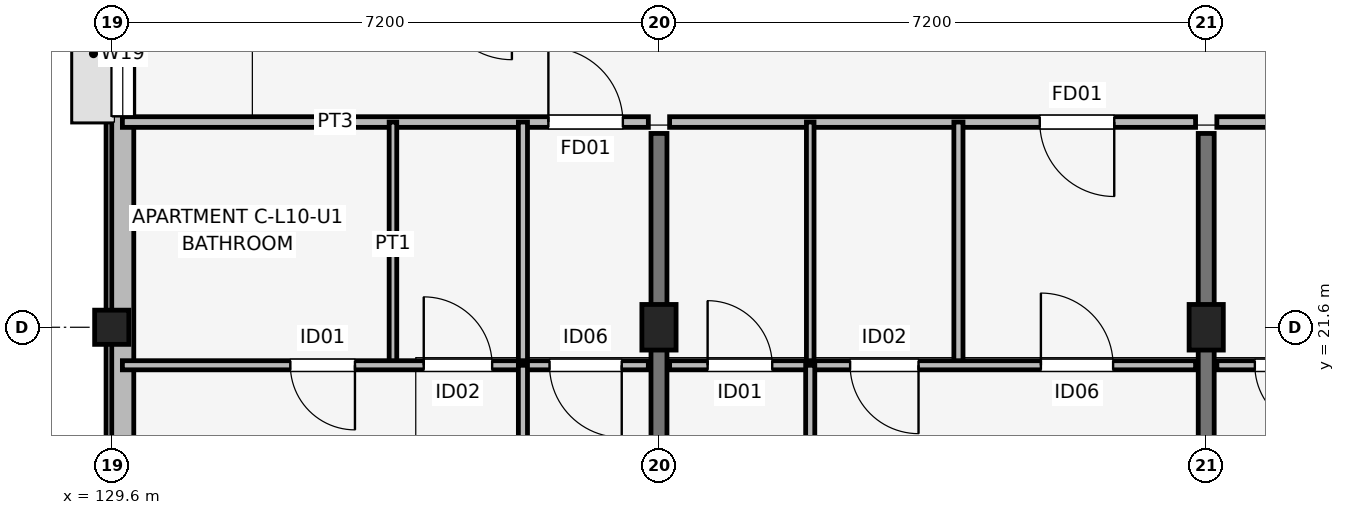
"""IFC4 building model, lengths in metres.
Left out: names, types, materials, properties, quantities, classifications, styles, units other than length and angle.
Written with IfcOpenShell. Run it as: python <this file> out.ifc"""

import sys

from ifc_helpers import new_model, si_unit, direction, frame, frame_2d, origin, origin_2d, place, context, subcontext, project, spatial, rectangle, extrude, element, fill, save


model = new_model("IFC4")
c1 = context("Model", 3, precision=1e-05, world=origin(), true_north=direction((0.0, 1.0)))
c2 = subcontext(c1, "Body", "Model", "MODEL_VIEW")
j1 = project(units=[si_unit("LENGTHUNIT", "METRE"), si_unit("PLANEANGLEUNIT", "RADIAN")], contexts=[c1])
p1 = place(None, origin())
s1 = spatial("IfcSite", under=j1, at=p1, CompositionType="ELEMENT")
p2 = place(p1, origin())
s2 = spatial("IfcBuilding", under=s1, at=p2, CompositionType="ELEMENT")
p3 = place(p2, frame((0.0, 0.0, 33.9)))
s3 = spatial("IfcBuildingStorey", under=s2, at=p3, CompositionType="ELEMENT", Elevation=33.9)
p4 = place(p3, frame((129.6, 21.6, 0.0), z_axis=(0.0, 0.0, 1.0), x_axis=(1.0, 0.0, 0.0)))
e1 = element("IfcColumn", 1, at=p4, inside=s3, PredefinedType="COLUMN", context=c2, shape_type="SweptSolid", body=[
    extrude(rectangle(XDim=0.45, YDim=0.45, at=origin_2d()), origin(), (0.0, 0.0, 1.0), 3.15),
])
for number, where, z_axis, x_axis in (
    (2, (136.8, 21.6, 0.0), (0.0, 0.0, 1.0), (1.0, 0.0, 0.0)),
    (3, (144.0, 21.6, 0.0), (0.0, 0.0, 1.0), (1.0, 0.0, 0.0)),
):
    element("IfcColumn", number, at=place(p3, frame(where, z_axis=z_axis, x_axis=x_axis)), inside=s3, PredefinedType="COLUMN", context=c2, shape_type="SweptSolid", body=[
        extrude(rectangle(XDim=0.45, YDim=0.6, at=origin_2d()), origin(), (0.0, 0.0, 1.0), 3.15),
    ])
for number, where, z_axis, x_axis in (
    (4, (136.8, 14.75, 0.0), (0.0, 0.0, 1.0), (0.0, 1.0, 0.0)),
    (5, (144.0, 14.75, 0.0), (0.0, 0.0, 1.0), (0.0, 1.0, 0.0)),
):
    element("IfcWall", number, at=place(p3, frame(where, z_axis=z_axis, x_axis=x_axis)), inside=s3, PredefinedType="SHEAR", context=c2, shape_type="SweptSolid", body=[
        extrude(rectangle(XDim=9.4, YDim=0.21, at=frame_2d((4.7, 0.0))), origin(), (0.0, 0.0, 1.0), 3.15),
    ])
p5 = place(p3, frame((129.745, 33.0, 0.0), z_axis=(0.0, 0.0, 1.0), x_axis=(0.0, -1.0, 0.0)))
e6 = element("IfcWall", 6, at=p5, inside=s3, PredefinedType="SOLIDWALL", context=c2, shape_type="SweptSolid", body=[
    extrude(rectangle(XDim=15.6, YDim=0.29, at=frame_2d((7.8, 0.0))), origin(), (0.0, 0.0, 1.0), 2.48),
])
p6 = place(p5, frame((6.975, 0.0, 1.05)))
e7 = element("IfcOpeningElement", 7, at=p6, cuts=e6, PredefinedType="OPENING", context=c2, shape_type="SweptSolid", body=[
    extrude(rectangle(XDim=1.65, YDim=1.15, at=frame_2d((0.825, 0.575))), frame((0.0, 0.155, 0.0), z_axis=(0.0, -1.0, 0.0), x_axis=(1.0, 0.0, 0.0)), (0.0, 0.0, 1.0), 0.31),
])
p7 = place(p5, frame((12.925, 0.0, 0.75)))
e8 = element("IfcOpeningElement", 8, at=p7, cuts=e6, PredefinedType="OPENING", context=c2, shape_type="SweptSolid", body=[
    extrude(rectangle(XDim=1.42, YDim=1.6, at=frame_2d((0.71, 0.8))), frame((0.0, 0.155, 0.0), z_axis=(0.0, -1.0, 0.0), x_axis=(1.0, 0.0, 0.0)), (0.0, 0.0, 1.0), 0.31),
])
p8 = place(p3, frame((129.74, 24.3, 0.0), z_axis=(0.0, 0.0, 1.0), x_axis=(1.0, 0.0, 0.0)))
e9 = element("IfcWall", 9, at=p8, inside=s3, PredefinedType="PARTITIONING", context=c2, shape_type="SweptSolid", body=[
    extrude(rectangle(XDim=6.92, YDim=0.14, at=frame_2d((3.46, 0.0))), origin(), (0.0, 0.0, 1.0), 2.38),
])
p9 = place(p8, frame((5.605, 0.0, 0.0)))
e10 = element("IfcOpeningElement", 10, at=p9, cuts=e9, PredefinedType="OPENING", context=c2, shape_type="SweptSolid", body=[
    extrude(rectangle(XDim=0.98, YDim=2.1, at=frame_2d((0.49, 1.05))), frame((0.0, 0.08, 0.0), z_axis=(0.0, -1.0, 0.0), x_axis=(1.0, 0.0, 0.0)), (0.0, 0.0, 1.0), 0.16),
])
p10 = place(p3, frame((133.3, 21.1, 0.0), z_axis=(0.0, 0.0, 1.0), x_axis=(0.0, 1.0, 0.0)))
e11 = element("IfcWall", 11, at=p10, inside=s3, PredefinedType="PARTITIONING", context=c2, shape_type="SweptSolid", body=[
    extrude(rectangle(XDim=3.2, YDim=0.1, at=frame_2d((1.6, 0.0))), origin(), (0.0, 0.0, 1.0), 2.38),
])
p11 = place(p3, frame((135.01, 21.1, 0.0), z_axis=(0.0, 0.0, 1.0), x_axis=(0.0, 1.0, 0.0)))
e12 = element("IfcWall", 12, at=p11, inside=s3, PredefinedType="PARTITIONING", context=c2, shape_type="SweptSolid", body=[
    extrude(rectangle(XDim=3.2, YDim=0.12, at=frame_2d((1.6, 0.0))), origin(), (0.0, 0.0, 1.0), 2.38),
])
p12 = place(p3, frame((129.74, 21.1, 0.0), z_axis=(0.0, 0.0, 1.0), x_axis=(1.0, 0.0, 0.0)))
e13 = element("IfcWall", 13, at=p12, inside=s3, PredefinedType="PARTITIONING", context=c2, shape_type="SweptSolid", body=[
    extrude(rectangle(XDim=6.92, YDim=0.12, at=frame_2d((3.46, 0.0))), origin(), (0.0, 0.0, 1.0), 2.38),
])
p13 = place(p12, frame((3.06, 0.0, 0.0), z_axis=(0.0, 0.0, 1.0), x_axis=(-1.0, 0.0, 0.0)))
e14 = element("IfcOpeningElement", 14, at=p13, cuts=e13, PredefinedType="OPENING", context=c2, shape_type="SweptSolid", body=[
    extrude(rectangle(XDim=0.85, YDim=2.08, at=frame_2d((0.425, 1.04))), frame((0.0, 0.07, 0.0), z_axis=(0.0, -1.0, 0.0), x_axis=(1.0, 0.0, 0.0)), (0.0, 0.0, 1.0), 0.14),
])
p14 = place(p12, frame((3.965, 0.0, 0.0)))
e15 = element("IfcOpeningElement", 15, at=p14, cuts=e13, PredefinedType="OPENING", context=c2, shape_type="SweptSolid", body=[
    extrude(rectangle(XDim=0.9, YDim=2.08, at=frame_2d((0.45, 1.04))), frame((0.0, 0.07, 0.0), z_axis=(0.0, -1.0, 0.0), x_axis=(1.0, 0.0, 0.0)), (0.0, 0.0, 1.0), 0.14),
])
p15 = place(p12, frame((6.57, 0.0, 0.0), z_axis=(0.0, 0.0, 1.0), x_axis=(-1.0, 0.0, 0.0)))
e16 = element("IfcOpeningElement", 16, at=p15, cuts=e13, PredefinedType="OPENING", context=c2, shape_type="SweptSolid", body=[
    extrude(rectangle(XDim=0.95, YDim=2.08, at=frame_2d((0.475, 1.04))), frame((0.0, 0.07, 0.0), z_axis=(0.0, -1.0, 0.0), x_axis=(1.0, 0.0, 0.0)), (0.0, 0.0, 1.0), 0.14),
])
p16 = place(p3, frame((135.01, 14.7, 0.0), z_axis=(0.0, 0.0, 1.0), x_axis=(0.0, 1.0, 0.0)))
e17 = element("IfcWall", 17, at=p16, inside=s3, PredefinedType="PARTITIONING", context=c2, shape_type="SweptSolid", body=[
    extrude(rectangle(XDim=6.4, YDim=0.12, at=frame_2d((3.2, 0.0))), origin(), (0.0, 0.0, 1.0), 2.38),
])
p17 = place(p16, frame((2.75, 0.0, 0.0)))
e18 = element("IfcOpeningElement", 18, at=p17, cuts=e17, PredefinedType="OPENING", context=c2, shape_type="SweptSolid", body=[
    extrude(rectangle(XDim=0.9, YDim=2.08, at=frame_2d((0.45, 1.04))), frame((0.0, 0.07, 0.0), z_axis=(0.0, -1.0, 0.0), x_axis=(1.0, 0.0, 0.0)), (0.0, 0.0, 1.0), 0.14),
])
p18 = place(p3, frame((136.94, 24.3, 0.0), z_axis=(0.0, 0.0, 1.0), x_axis=(1.0, 0.0, 0.0)))
e19 = element("IfcWall", 19, at=p18, inside=s3, PredefinedType="PARTITIONING", context=c2, shape_type="SweptSolid", body=[
    extrude(rectangle(XDim=6.92, YDim=0.14, at=frame_2d((3.46, 0.0))), origin(), (0.0, 0.0, 1.0), 2.38),
])
p19 = place(p18, frame((5.85, 0.0, 0.0), z_axis=(0.0, 0.0, 1.0), x_axis=(-1.0, 0.0, 0.0)))
e20 = element("IfcOpeningElement", 20, at=p19, cuts=e19, PredefinedType="OPENING", context=c2, shape_type="SweptSolid", body=[
    extrude(rectangle(XDim=0.98, YDim=2.1, at=frame_2d((0.49, 1.05))), frame((0.0, 0.08, 0.0), z_axis=(0.0, -1.0, 0.0), x_axis=(1.0, 0.0, 0.0)), (0.0, 0.0, 1.0), 0.16),
])
p20 = place(p3, frame((138.79, 21.1, 0.0), z_axis=(0.0, 0.0, 1.0), x_axis=(0.0, 1.0, 0.0)))
e21 = element("IfcWall", 21, at=p20, inside=s3, PredefinedType="PARTITIONING", context=c2, shape_type="SweptSolid", body=[
    extrude(rectangle(XDim=3.2, YDim=0.1, at=frame_2d((1.6, 0.0))), origin(), (0.0, 0.0, 1.0), 2.38),
])
p21 = place(p3, frame((140.74, 21.1, 0.0), z_axis=(0.0, 0.0, 1.0), x_axis=(0.0, 1.0, 0.0)))
e22 = element("IfcWall", 22, at=p21, inside=s3, PredefinedType="PARTITIONING", context=c2, shape_type="SweptSolid", body=[
    extrude(rectangle(XDim=3.2, YDim=0.12, at=frame_2d((1.6, 0.0))), origin(), (0.0, 0.0, 1.0), 2.38),
])
p22 = place(p3, frame((136.94, 21.1, 0.0), z_axis=(0.0, 0.0, 1.0), x_axis=(1.0, 0.0, 0.0)))
e23 = element("IfcWall", 23, at=p22, inside=s3, PredefinedType="PARTITIONING", context=c2, shape_type="SweptSolid", body=[
    extrude(rectangle(XDim=6.92, YDim=0.12, at=frame_2d((3.46, 0.0))), origin(), (0.0, 0.0, 1.0), 2.38),
])
p23 = place(p22, frame((0.5, 0.0, 0.0)))
e24 = element("IfcOpeningElement", 24, at=p23, cuts=e23, PredefinedType="OPENING", context=c2, shape_type="SweptSolid", body=[
    extrude(rectangle(XDim=0.85, YDim=2.08, at=frame_2d((0.425, 1.04))), frame((0.0, 0.07, 0.0), z_axis=(0.0, -1.0, 0.0), x_axis=(1.0, 0.0, 0.0)), (0.0, 0.0, 1.0), 0.14),
])
p24 = place(p22, frame((3.275, 0.0, 0.0), z_axis=(0.0, 0.0, 1.0), x_axis=(-1.0, 0.0, 0.0)))
e25 = element("IfcOpeningElement", 25, at=p24, cuts=e23, PredefinedType="OPENING", context=c2, shape_type="SweptSolid", body=[
    extrude(rectangle(XDim=0.9, YDim=2.08, at=frame_2d((0.45, 1.04))), frame((0.0, 0.07, 0.0), z_axis=(0.0, -1.0, 0.0), x_axis=(1.0, 0.0, 0.0)), (0.0, 0.0, 1.0), 0.14),
])
p25 = place(p22, frame((4.885, 0.0, 0.0)))
e26 = element("IfcOpeningElement", 26, at=p25, cuts=e23, PredefinedType="OPENING", context=c2, shape_type="SweptSolid", body=[
    extrude(rectangle(XDim=0.95, YDim=2.08, at=frame_2d((0.475, 1.04))), frame((0.0, 0.07, 0.0), z_axis=(0.0, -1.0, 0.0), x_axis=(1.0, 0.0, 0.0)), (0.0, 0.0, 1.0), 0.14),
])
p26 = place(p3, frame((138.79, 14.7, 0.0), z_axis=(0.0, 0.0, 1.0), x_axis=(0.0, 1.0, 0.0)))
e27 = element("IfcWall", 27, at=p26, inside=s3, PredefinedType="PARTITIONING", context=c2, shape_type="SweptSolid", body=[
    extrude(rectangle(XDim=6.4, YDim=0.12, at=frame_2d((3.2, 0.0))), origin(), (0.0, 0.0, 1.0), 2.38),
])
p27 = place(p26, frame((3.65, 0.0, 0.0), z_axis=(0.0, 0.0, 1.0), x_axis=(-1.0, 0.0, 0.0)))
e28 = element("IfcOpeningElement", 28, at=p27, cuts=e27, PredefinedType="OPENING", context=c2, shape_type="SweptSolid", body=[
    extrude(rectangle(XDim=0.9, YDim=2.08, at=frame_2d((0.45, 1.04))), frame((0.0, 0.07, 0.0), z_axis=(0.0, -1.0, 0.0), x_axis=(1.0, 0.0, 0.0)), (0.0, 0.0, 1.0), 0.14),
])
p28 = place(p3, frame((144.14, 24.3, 0.0), z_axis=(0.0, 0.0, 1.0), x_axis=(1.0, 0.0, 0.0)))
e29 = element("IfcWall", 29, at=p28, inside=s3, PredefinedType="PARTITIONING", context=c2, shape_type="SweptSolid", body=[
    extrude(rectangle(XDim=6.92, YDim=0.14, at=frame_2d((3.46, 0.0))), origin(), (0.0, 0.0, 1.0), 2.38),
])
p29 = place(p28, frame((5.02, 0.0, 0.0)))
e30 = element("IfcOpeningElement", 30, at=p29, cuts=e29, PredefinedType="OPENING", context=c2, shape_type="SweptSolid", body=[
    extrude(rectangle(XDim=0.98, YDim=2.1, at=frame_2d((0.49, 1.05))), frame((0.0, 0.08, 0.0), z_axis=(0.0, -1.0, 0.0), x_axis=(1.0, 0.0, 0.0)), (0.0, 0.0, 1.0), 0.16),
])
p30 = place(p3, frame((144.14, 21.1, 0.0), z_axis=(0.0, 0.0, 1.0), x_axis=(1.0, 0.0, 0.0)))
e31 = element("IfcWall", 31, at=p30, inside=s3, PredefinedType="PARTITIONING", context=c2, shape_type="SweptSolid", body=[
    extrude(rectangle(XDim=6.92, YDim=0.12, at=frame_2d((3.46, 0.0))), origin(), (0.0, 0.0, 1.0), 2.38),
])
p31 = place(p30, frame((1.35, 0.0, 0.0), z_axis=(0.0, 0.0, 1.0), x_axis=(-1.0, 0.0, 0.0)))
e32 = element("IfcOpeningElement", 32, at=p31, cuts=e31, PredefinedType="OPENING", context=c2, shape_type="SweptSolid", body=[
    extrude(rectangle(XDim=0.85, YDim=2.08, at=frame_2d((0.425, 1.04))), frame((0.0, 0.07, 0.0), z_axis=(0.0, -1.0, 0.0), x_axis=(1.0, 0.0, 0.0)), (0.0, 0.0, 1.0), 0.14),
])
p32 = place(p30, frame((2.525, 0.0, 0.0)))
e33 = element("IfcOpeningElement", 33, at=p32, cuts=e31, PredefinedType="OPENING", context=c2, shape_type="SweptSolid", body=[
    extrude(rectangle(XDim=0.9, YDim=2.08, at=frame_2d((0.45, 1.04))), frame((0.0, 0.07, 0.0), z_axis=(0.0, -1.0, 0.0), x_axis=(1.0, 0.0, 0.0)), (0.0, 0.0, 1.0), 0.14),
])
p33 = place(p30, frame((5.985, 0.0, 0.0), z_axis=(0.0, 0.0, 1.0), x_axis=(-1.0, 0.0, 0.0)))
e34 = element("IfcOpeningElement", 34, at=p33, cuts=e31, PredefinedType="OPENING", context=c2, shape_type="SweptSolid", body=[
    extrude(rectangle(XDim=0.95, YDim=2.08, at=frame_2d((0.475, 1.04))), frame((0.0, 0.07, 0.0), z_axis=(0.0, -1.0, 0.0), x_axis=(1.0, 0.0, 0.0)), (0.0, 0.0, 1.0), 0.14),
])
p34 = place(p6, origin())
e35 = element("IfcWindow", 35, at=p34, inside=s3, PartitioningType="SINGLE_PANEL", PredefinedType="WINDOW", context=c2, shape_type="SweptSolid", body=[
    extrude(rectangle(XDim=1.65, YDim=1.15, at=frame_2d((0.825, 0.575))), frame((0.0, 0.03, 0.0), z_axis=(0.0, -1.0, 0.0), x_axis=(1.0, 0.0, 0.0)), (0.0, 0.0, 1.0), 0.06),
])
fill(e7, e35)
p35 = place(p9, origin())
e36 = element("IfcDoor", 36, at=p35, inside=s3, OperationType="SINGLE_SWING_LEFT", PredefinedType="DOOR", context=c2, shape_type="SweptSolid", body=[
    extrude(rectangle(XDim=0.98, YDim=2.1, at=frame_2d((0.49, 1.05))), frame((0.0, 0.025, 0.0), z_axis=(0.0, -1.0, 0.0), x_axis=(1.0, 0.0, 0.0)), (0.0, 0.0, 1.0), 0.05),
])
fill(e10, e36)
p36 = place(p13, origin())
e37 = element("IfcDoor", 37, at=p36, inside=s3, OperationType="SINGLE_SWING_RIGHT", PredefinedType="DOOR", context=c2, shape_type="SweptSolid", body=[
    extrude(rectangle(XDim=0.85, YDim=2.08, at=frame_2d((0.425, 1.04))), frame((0.0, 0.025, 0.0), z_axis=(0.0, -1.0, 0.0), x_axis=(1.0, 0.0, 0.0)), (0.0, 0.0, 1.0), 0.05),
])
fill(e14, e37)
p37 = place(p14, origin())
e38 = element("IfcDoor", 38, at=p37, inside=s3, OperationType="SINGLE_SWING_LEFT", PredefinedType="DOOR", context=c2, shape_type="SweptSolid", body=[
    extrude(rectangle(XDim=0.9, YDim=2.08, at=frame_2d((0.45, 1.04))), frame((0.0, 0.025, 0.0), z_axis=(0.0, -1.0, 0.0), x_axis=(1.0, 0.0, 0.0)), (0.0, 0.0, 1.0), 0.05),
])
fill(e15, e38)
p38 = place(p15, origin())
e39 = element("IfcDoor", 39, at=p38, inside=s3, OperationType="SINGLE_SWING_RIGHT", PredefinedType="DOOR", context=c2, shape_type="SweptSolid", body=[
    extrude(rectangle(XDim=0.95, YDim=2.08, at=frame_2d((0.475, 1.04))), frame((0.0, 0.025, 0.0), z_axis=(0.0, -1.0, 0.0), x_axis=(1.0, 0.0, 0.0)), (0.0, 0.0, 1.0), 0.05),
])
fill(e16, e39)
p39 = place(p19, origin())
e40 = element("IfcDoor", 40, at=p39, inside=s3, OperationType="SINGLE_SWING_RIGHT", PredefinedType="DOOR", context=c2, shape_type="SweptSolid", body=[
    extrude(rectangle(XDim=0.98, YDim=2.1, at=frame_2d((0.49, 1.05))), frame((0.0, 0.025, 0.0), z_axis=(0.0, -1.0, 0.0), x_axis=(1.0, 0.0, 0.0)), (0.0, 0.0, 1.0), 0.05),
])
fill(e20, e40)
p40 = place(p23, origin())
e41 = element("IfcDoor", 41, at=p40, inside=s3, OperationType="SINGLE_SWING_LEFT", PredefinedType="DOOR", context=c2, shape_type="SweptSolid", body=[
    extrude(rectangle(XDim=0.85, YDim=2.08, at=frame_2d((0.425, 1.04))), frame((0.0, 0.025, 0.0), z_axis=(0.0, -1.0, 0.0), x_axis=(1.0, 0.0, 0.0)), (0.0, 0.0, 1.0), 0.05),
])
fill(e24, e41)
p41 = place(p24, origin())
e42 = element("IfcDoor", 42, at=p41, inside=s3, OperationType="SINGLE_SWING_RIGHT", PredefinedType="DOOR", context=c2, shape_type="SweptSolid", body=[
    extrude(rectangle(XDim=0.9, YDim=2.08, at=frame_2d((0.45, 1.04))), frame((0.0, 0.025, 0.0), z_axis=(0.0, -1.0, 0.0), x_axis=(1.0, 0.0, 0.0)), (0.0, 0.0, 1.0), 0.05),
])
fill(e25, e42)
p42 = place(p25, origin())
e43 = element("IfcDoor", 43, at=p42, inside=s3, OperationType="SINGLE_SWING_LEFT", PredefinedType="DOOR", context=c2, shape_type="SweptSolid", body=[
    extrude(rectangle(XDim=0.95, YDim=2.08, at=frame_2d((0.475, 1.04))), frame((0.0, 0.025, 0.0), z_axis=(0.0, -1.0, 0.0), x_axis=(1.0, 0.0, 0.0)), (0.0, 0.0, 1.0), 0.05),
])
fill(e26, e43)
p43 = place(p31, origin())
e44 = element("IfcDoor", 44, at=p43, inside=s3, OperationType="SINGLE_SWING_RIGHT", PredefinedType="DOOR", context=c2, shape_type="SweptSolid", body=[
    extrude(rectangle(XDim=0.85, YDim=2.08, at=frame_2d((0.425, 1.04))), frame((0.0, 0.025, 0.0), z_axis=(0.0, -1.0, 0.0), x_axis=(1.0, 0.0, 0.0)), (0.0, 0.0, 1.0), 0.05),
])
fill(e32, e44)
save(model, sys.argv[1])
